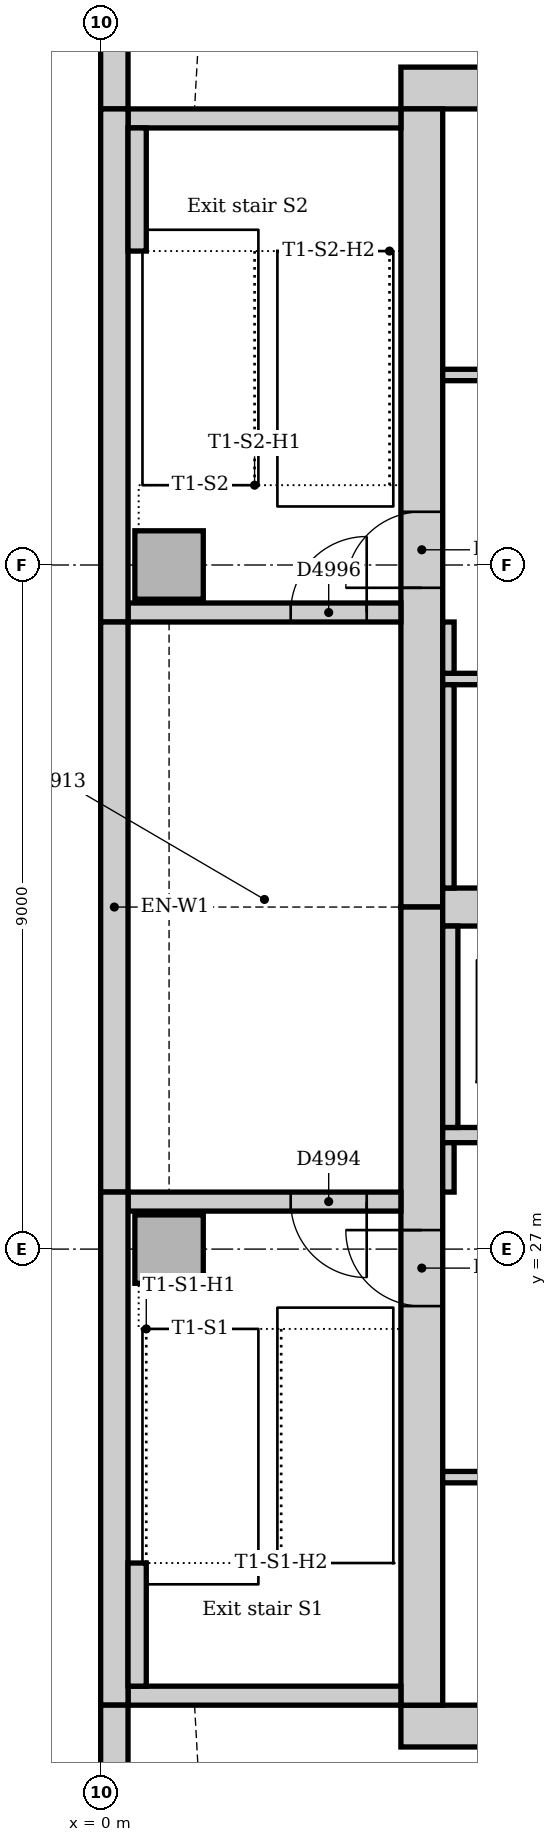
"""IFC4 building model, lengths in metres.
Left out: names, types, materials, properties, quantities, classifications, styles, units other than length and angle.
Written with IfcOpenShell. Run it as: python <this file> out.ifc"""

import sys

from ifc_helpers import new_model, si_unit, direction, frame, frame_2d, origin, origin_2d, place, context, subcontext, project, spatial, rectangle, extrude, element, fill, save


model = new_model("IFC4")
c1 = context("Model", 3, precision=1e-05, world=origin(), true_north=direction((0.0, 1.0)))
c2 = subcontext(c1, "Body", "Model", "MODEL_VIEW")
j1 = project(units=[si_unit("LENGTHUNIT", "METRE"), si_unit("PLANEANGLEUNIT", "RADIAN")], contexts=[c1])
p1 = place(None, origin())
s1 = spatial("IfcSite", under=j1, at=p1, CompositionType="ELEMENT")
p2 = place(p1, origin())
s2 = spatial("IfcBuilding", under=s1, at=p2, CompositionType="ELEMENT")
p3 = place(p2, frame((0.0, 0.0, 206.0)))
s3 = spatial("IfcBuildingStorey", under=s2, at=p3, CompositionType="ELEMENT", Elevation=206.0)
for number, where, z_axis, x_axis in (
    (1, (3.95, 20.725, 0.0), (0.0, 0.0, 1.0), (1.0, 0.0, 0.0)),
    (2, (23.05, 42.275, 0.0), (0.0, 0.0, 1.0), (-1.0, 0.0, 0.0)),
):
    element("IfcWall", number, at=place(p3, frame(where, z_axis=z_axis, x_axis=x_axis)), inside=s3, PredefinedType="SOLIDWALL", context=c2, shape_type="SweptSolid", body=[
        extrude(rectangle(XDim=19.1, YDim=0.55, at=frame_2d((9.55, 0.0))), origin(), (0.0, 0.0, 1.0), 4.0),
    ])
p4 = place(p3, frame((4.225, 42.0, 0.0), z_axis=(0.0, 0.0, 1.0), x_axis=(0.0, -1.0, 0.0)))
e3 = element("IfcWall", 3, at=p4, inside=s3, PredefinedType="SOLIDWALL", context=c2, shape_type="SweptSolid", body=[
    extrude(rectangle(XDim=10.5, YDim=0.55, at=frame_2d((5.25, 0.0))), origin(), (0.0, 0.0, 1.0), 4.0),
])
p5 = place(p4, frame((5.3, 0.0, 0.0)))
e4 = element("IfcOpeningElement", 4, at=p5, cuts=e3, PredefinedType="OPENING", context=c2, shape_type="SweptSolid", body=[
    extrude(rectangle(XDim=1.0, YDim=2.1, at=frame_2d((0.5, 1.05))), frame((0.0, 0.285, 0.0), z_axis=(0.0, -1.0, 0.0), x_axis=(1.0, 0.0, 0.0)), (0.0, 0.0, 1.0), 0.57),
])
p6 = place(p3, frame((4.225, 31.5, 0.0), z_axis=(0.0, 0.0, 1.0), x_axis=(0.0, -1.0, 0.0)))
e5 = element("IfcWall", 5, at=p6, inside=s3, PredefinedType="SOLIDWALL", context=c2, shape_type="SweptSolid", body=[
    extrude(rectangle(XDim=10.5, YDim=0.55, at=frame_2d((5.25, 0.0))), origin(), (0.0, 0.0, 1.0), 4.0),
])
p7 = place(p6, frame((4.25, 0.0, 0.0)))
e6 = element("IfcOpeningElement", 6, at=p7, cuts=e5, PredefinedType="OPENING", context=c2, shape_type="SweptSolid", body=[
    extrude(rectangle(XDim=1.0, YDim=2.1, at=frame_2d((0.5, 1.05))), frame((0.0, 0.285, 0.0), z_axis=(0.0, -1.0, 0.0), x_axis=(1.0, 0.0, 0.0)), (0.0, 0.0, 1.0), 0.57),
])
p8 = place(p3, frame((4.5, 31.5, 0.0), z_axis=(0.0, 0.0, 1.0), x_axis=(1.0, 0.0, 0.0)))
e7 = element("IfcWall", 7, at=p8, inside=s3, PredefinedType="SOLIDWALL", context=c2, shape_type="SweptSolid", body=[
    extrude(rectangle(XDim=18.0, YDim=0.5, at=frame_2d((9.0, 0.0))), origin(), (0.0, 0.0, 1.0), 4.0),
])
p9 = place(p3, frame((0.36, 21.125, 0.0), z_axis=(0.0, 0.0, 1.0), x_axis=(1.0, 0.0, 0.0)))
e8 = element("IfcWall", 8, at=p9, inside=s3, PredefinedType="SOLIDWALL", context=c2, shape_type="SweptSolid", body=[
    extrude(rectangle(XDim=3.59, YDim=0.25, at=frame_2d((1.795, 0.0))), origin(), (0.0, 0.0, 1.0), 4.0),
])
p10 = place(p3, frame((3.95, 27.625, 0.0), z_axis=(0.0, 0.0, 1.0), x_axis=(-1.0, 0.0, 0.0)))
e9 = element("IfcWall", 9, at=p10, inside=s3, PredefinedType="SOLIDWALL", context=c2, shape_type="SweptSolid", body=[
    extrude(rectangle(XDim=3.59, YDim=0.25, at=frame_2d((1.795, 0.0))), origin(), (0.0, 0.0, 1.0), 4.0),
])
p11 = place(p10, frame((0.45, 0.0, 0.0)))
e10 = element("IfcOpeningElement", 10, at=p11, cuts=e9, PredefinedType="OPENING", context=c2, shape_type="SweptSolid", body=[
    extrude(rectangle(XDim=1.0, YDim=2.1, at=frame_2d((0.5, 1.05))), frame((0.0, 0.135, 0.0), z_axis=(0.0, -1.0, 0.0), x_axis=(1.0, 0.0, 0.0)), (0.0, 0.0, 1.0), 0.27),
])
p12 = place(p3, frame((0.36, 35.375, 0.0), z_axis=(0.0, 0.0, 1.0), x_axis=(1.0, 0.0, 0.0)))
e11 = element("IfcWall", 11, at=p12, inside=s3, PredefinedType="SOLIDWALL", context=c2, shape_type="SweptSolid", body=[
    extrude(rectangle(XDim=3.59, YDim=0.25, at=frame_2d((1.795, 0.0))), origin(), (0.0, 0.0, 1.0), 4.0),
])
p13 = place(p12, frame((2.14, 0.0, 0.0)))
e12 = element("IfcOpeningElement", 12, at=p13, cuts=e11, PredefinedType="OPENING", context=c2, shape_type="SweptSolid", body=[
    extrude(rectangle(XDim=1.0, YDim=2.1, at=frame_2d((0.5, 1.05))), frame((0.0, 0.135, 0.0), z_axis=(0.0, -1.0, 0.0), x_axis=(1.0, 0.0, 0.0)), (0.0, 0.0, 1.0), 0.27),
])
p14 = place(p3, frame((3.95, 41.875, 0.0), z_axis=(0.0, 0.0, 1.0), x_axis=(-1.0, 0.0, 0.0)))
e13 = element("IfcWall", 13, at=p14, inside=s3, PredefinedType="SOLIDWALL", context=c2, shape_type="SweptSolid", body=[
    extrude(rectangle(XDim=3.59, YDim=0.25, at=frame_2d((1.795, 0.0))), origin(), (0.0, 0.0, 1.0), 4.0),
])
for number, where, z_axis, x_axis in (
    (14, (0.9, 27.0, 0.0), (0.0, 0.0, 1.0), (1.0, 0.0, 0.0)),
    (15, (0.9, 36.0, 0.0), (0.0, 0.0, 1.0), (1.0, 0.0, 0.0)),
):
    element("IfcColumn", number, at=place(p3, frame(where, z_axis=z_axis, x_axis=x_axis)), inside=s3, PredefinedType="COLUMN", context=c2, shape_type="SweptSolid", body=[
        extrude(rectangle(XDim=0.9, YDim=0.9, at=origin_2d()), origin(), (0.0, 0.0, 1.0), 4.0),
    ])
p15 = place(p3, frame((0.18, 54.257, 0.0), z_axis=(0.0, 0.0, 1.0), x_axis=(0.0, -1.0, 0.0)))
e16 = element("IfcWall", 16, at=p15, inside=s3, PredefinedType="STANDARD", context=c2, shape_type="SweptSolid", body=[
    extrude(rectangle(XDim=12.257, YDim=0.36, at=frame_2d((6.129, 0.0))), origin(), (0.0, 0.0, 1.0), 3.85),
])
p16 = place(p15, frame((3.107, 0.0, 0.9)))
e17 = element("IfcOpeningElement", 17, at=p16, cuts=e16, PredefinedType="OPENING", context=c2, shape_type="SweptSolid", body=[
    extrude(rectangle(XDim=3.3, YDim=1.6, at=frame_2d((1.65, 0.8))), frame((0.0, 0.19, 0.0), z_axis=(0.0, -1.0, 0.0), x_axis=(1.0, 0.0, 0.0)), (0.0, 0.0, 1.0), 0.38),
])
p17 = place(p15, frame((7.607, 0.0, 0.9)))
e18 = element("IfcOpeningElement", 18, at=p17, cuts=e16, PredefinedType="OPENING", context=c2, shape_type="SweptSolid", body=[
    extrude(rectangle(XDim=3.3, YDim=1.6, at=frame_2d((1.65, 0.8))), frame((0.0, 0.19, 0.0), z_axis=(0.0, -1.0, 0.0), x_axis=(1.0, 0.0, 0.0)), (0.0, 0.0, 1.0), 0.38),
])
p18 = place(p3, frame((0.18, 42.0, 0.0), z_axis=(0.0, 0.0, 1.0), x_axis=(0.0, -1.0, 0.0)))
e19 = element("IfcWall", 19, at=p18, inside=s3, PredefinedType="STANDARD", context=c2, shape_type="SweptSolid", body=[
    extrude(rectangle(XDim=6.75, YDim=0.36, at=frame_2d((3.375, 0.0))), origin(), (0.0, 0.0, 1.0), 3.85),
])
p19 = place(p3, frame((0.18, 35.25, 0.0), z_axis=(0.0, 0.0, 1.0), x_axis=(0.0, -1.0, 0.0)))
e20 = element("IfcWall", 20, at=p19, inside=s3, PredefinedType="STANDARD", context=c2, shape_type="SweptSolid", body=[
    extrude(rectangle(XDim=7.5, YDim=0.36, at=frame_2d((3.75, 0.0))), origin(), (0.0, 0.0, 1.0), 3.85),
])
p20 = place(p3, frame((0.18, 27.75, 0.0), z_axis=(0.0, 0.0, 1.0), x_axis=(0.0, -1.0, 0.0)))
e21 = element("IfcWall", 21, at=p20, inside=s3, PredefinedType="STANDARD", context=c2, shape_type="SweptSolid", body=[
    extrude(rectangle(XDim=6.75, YDim=0.36, at=frame_2d((3.375, 0.0))), origin(), (0.0, 0.0, 1.0), 3.85),
])
p21 = place(p3, frame((0.18, 21.0, 0.0), z_axis=(0.0, 0.0, 1.0), x_axis=(0.0, -1.0, 0.0)))
e22 = element("IfcWall", 22, at=p21, inside=s3, PredefinedType="STANDARD", context=c2, shape_type="SweptSolid", body=[
    extrude(rectangle(XDim=3.257, YDim=0.36, at=frame_2d((1.629, 0.0))), origin(), (0.0, 0.0, 1.0), 3.85),
])
for number, where, z_axis, x_axis in (
    (23, (0.48, 21.25, 0.0), (0.0, 0.0, 1.0), (0.0, 1.0, 0.0)),
    (24, (0.48, 40.13, 0.0), (0.0, 0.0, 1.0), (0.0, 1.0, 0.0)),
):
    element("IfcWall", number, at=place(p3, frame(where, z_axis=z_axis, x_axis=x_axis)), inside=s3, PredefinedType="STANDARD", context=c2, shape_type="SweptSolid", body=[
        extrude(rectangle(XDim=1.62, YDim=0.24, at=frame_2d((0.81, 0.0))), origin(), (0.0, 0.0, 1.0), 4.0),
    ])
p22 = place(p3, frame((4.5, 28.5, 0.0), z_axis=(0.0, 0.0, 1.0), x_axis=(1.0, 0.0, 0.0)))
e25 = element("IfcWall", 25, at=p22, inside=s3, PredefinedType="PARTITIONING", context=c2, shape_type="SweptSolid", body=[
    extrude(rectangle(XDim=18.0, YDim=0.2, at=frame_2d((9.0, 0.0))), origin(), (0.0, 0.0, 1.0), 3.85),
])
p23 = place(p22, frame((0.95, 0.0, 0.0)))
e26 = element("IfcOpeningElement", 26, at=p23, cuts=e25, PredefinedType="OPENING", context=c2, shape_type="SweptSolid", body=[
    extrude(rectangle(XDim=1.1, YDim=2.1, at=frame_2d((0.55, 1.05))), frame((0.0, 0.11, 0.0), z_axis=(0.0, -1.0, 0.0), x_axis=(1.0, 0.0, 0.0)), (0.0, 0.0, 1.0), 0.22),
])
p24 = place(p22, frame((3.95, 0.0, 0.0)))
e27 = element("IfcOpeningElement", 27, at=p24, cuts=e25, PredefinedType="OPENING", context=c2, shape_type="SweptSolid", body=[
    extrude(rectangle(XDim=1.1, YDim=2.1, at=frame_2d((0.55, 1.05))), frame((0.0, 0.11, 0.0), z_axis=(0.0, -1.0, 0.0), x_axis=(1.0, 0.0, 0.0)), (0.0, 0.0, 1.0), 0.22),
])
p25 = place(p22, frame((6.95, 0.0, 0.0)))
e28 = element("IfcOpeningElement", 28, at=p25, cuts=e25, PredefinedType="OPENING", context=c2, shape_type="SweptSolid", body=[
    extrude(rectangle(XDim=1.1, YDim=2.1, at=frame_2d((0.55, 1.05))), frame((0.0, 0.11, 0.0), z_axis=(0.0, -1.0, 0.0), x_axis=(1.0, 0.0, 0.0)), (0.0, 0.0, 1.0), 0.22),
])
p26 = place(p22, frame((9.95, 0.0, 0.0)))
e29 = element("IfcOpeningElement", 29, at=p26, cuts=e25, PredefinedType="OPENING", context=c2, shape_type="SweptSolid", body=[
    extrude(rectangle(XDim=1.1, YDim=2.1, at=frame_2d((0.55, 1.05))), frame((0.0, 0.11, 0.0), z_axis=(0.0, -1.0, 0.0), x_axis=(1.0, 0.0, 0.0)), (0.0, 0.0, 1.0), 0.22),
])
p27 = place(p22, frame((12.95, 0.0, 0.0)))
e30 = element("IfcOpeningElement", 30, at=p27, cuts=e25, PredefinedType="OPENING", context=c2, shape_type="SweptSolid", body=[
    extrude(rectangle(XDim=1.1, YDim=2.1, at=frame_2d((0.55, 1.05))), frame((0.0, 0.11, 0.0), z_axis=(0.0, -1.0, 0.0), x_axis=(1.0, 0.0, 0.0)), (0.0, 0.0, 1.0), 0.22),
])
p28 = place(p22, frame((15.95, 0.0, 0.0)))
e31 = element("IfcOpeningElement", 31, at=p28, cuts=e25, PredefinedType="OPENING", context=c2, shape_type="SweptSolid", body=[
    extrude(rectangle(XDim=1.1, YDim=2.1, at=frame_2d((0.55, 1.05))), frame((0.0, 0.11, 0.0), z_axis=(0.0, -1.0, 0.0), x_axis=(1.0, 0.0, 0.0)), (0.0, 0.0, 1.0), 0.22),
])
p29 = place(p3, frame((4.6, 28.6, 0.0), z_axis=(0.0, 0.0, 1.0), x_axis=(0.0, 1.0, 0.0)))
e32 = element("IfcWall", 32, at=p29, inside=s3, PredefinedType="PARTITIONING", context=c2, shape_type="SweptSolid", body=[
    extrude(rectangle(XDim=2.65, YDim=0.2, at=frame_2d((1.325, 0.0))), origin(), (0.0, 0.0, 1.0), 3.85),
])
p30 = place(p3, frame((4.5, 24.0, 0.0), z_axis=(0.0, 0.0, 1.0), x_axis=(1.0, 0.0, 0.0)))
e33 = element("IfcWall", 33, at=p30, inside=s3, PredefinedType="PARTITIONING", context=c2, shape_type="SweptSolid", body=[
    extrude(rectangle(XDim=18.0, YDim=0.15, at=frame_2d((9.0, 0.0))), origin(), (0.0, 0.0, 1.0), 3.85),
])
p31 = place(p30, frame((4.1, 0.0, 0.0)))
e34 = element("IfcOpeningElement", 34, at=p31, cuts=e33, PredefinedType="OPENING", context=c2, shape_type="SweptSolid", body=[
    extrude(rectangle(XDim=0.9, YDim=2.1, at=frame_2d((0.45, 1.05))), frame((0.0, 0.085, 0.0), z_axis=(0.0, -1.0, 0.0), x_axis=(1.0, 0.0, 0.0)), (0.0, 0.0, 1.0), 0.17),
])
p32 = place(p30, frame((10.8, 0.0, 0.0)))
e35 = element("IfcOpeningElement", 35, at=p32, cuts=e33, PredefinedType="OPENING", context=c2, shape_type="SweptSolid", body=[
    extrude(rectangle(XDim=0.9, YDim=2.1, at=frame_2d((0.45, 1.05))), frame((0.0, 0.085, 0.0), z_axis=(0.0, -1.0, 0.0), x_axis=(1.0, 0.0, 0.0)), (0.0, 0.0, 1.0), 0.17),
])
p33 = place(p30, frame((15.2, 0.0, 0.0)))
e36 = element("IfcOpeningElement", 36, at=p33, cuts=e33, PredefinedType="OPENING", context=c2, shape_type="SweptSolid", body=[
    extrude(rectangle(XDim=0.9, YDim=2.1, at=frame_2d((0.45, 1.05))), frame((0.0, 0.085, 0.0), z_axis=(0.0, -1.0, 0.0), x_axis=(1.0, 0.0, 0.0)), (0.0, 0.0, 1.0), 0.17),
])
p34 = place(p3, frame((4.5, 38.5, 0.0), z_axis=(0.0, 0.0, 1.0), x_axis=(1.0, 0.0, 0.0)))
e37 = element("IfcWall", 37, at=p34, inside=s3, PredefinedType="PARTITIONING", context=c2, shape_type="SweptSolid", body=[
    extrude(rectangle(XDim=11.9, YDim=0.15, at=frame_2d((5.95, 0.0))), origin(), (0.0, 0.0, 1.0), 3.85),
])
p35 = place(p34, frame((1.85, 0.0, 0.0)))
e38 = element("IfcOpeningElement", 38, at=p35, cuts=e37, PredefinedType="OPENING", context=c2, shape_type="SweptSolid", body=[
    extrude(rectangle(XDim=0.9, YDim=2.1, at=frame_2d((0.45, 1.05))), frame((0.0, 0.085, 0.0), z_axis=(0.0, -1.0, 0.0), x_axis=(1.0, 0.0, 0.0)), (0.0, 0.0, 1.0), 0.17),
])
p36 = place(p34, frame((5.55, 0.0, 0.0)))
e39 = element("IfcOpeningElement", 39, at=p36, cuts=e37, PredefinedType="OPENING", context=c2, shape_type="SweptSolid", body=[
    extrude(rectangle(XDim=0.9, YDim=2.1, at=frame_2d((0.45, 1.05))), frame((0.0, 0.085, 0.0), z_axis=(0.0, -1.0, 0.0), x_axis=(1.0, 0.0, 0.0)), (0.0, 0.0, 1.0), 0.17),
])
p37 = place(p34, frame((7.8, 0.0, 0.0)))
e40 = element("IfcOpeningElement", 40, at=p37, cuts=e37, PredefinedType="OPENING", context=c2, shape_type="SweptSolid", body=[
    extrude(rectangle(XDim=0.9, YDim=2.1, at=frame_2d((0.45, 1.05))), frame((0.0, 0.085, 0.0), z_axis=(0.0, -1.0, 0.0), x_axis=(1.0, 0.0, 0.0)), (0.0, 0.0, 1.0), 0.17),
])
p38 = place(p34, frame((9.95, 0.0, 0.0)))
e41 = element("IfcOpeningElement", 41, at=p38, cuts=e37, PredefinedType="OPENING", context=c2, shape_type="SweptSolid", body=[
    extrude(rectangle(XDim=0.8, YDim=2.1, at=frame_2d((0.4, 1.05))), frame((0.0, 0.085, 0.0), z_axis=(0.0, -1.0, 0.0), x_axis=(1.0, 0.0, 0.0)), (0.0, 0.0, 1.0), 0.17),
])
p39 = place(p3, frame((4.5, 34.5, 0.0), z_axis=(0.0, 0.0, 1.0), x_axis=(1.0, 0.0, 0.0)))
e42 = element("IfcWall", 42, at=p39, inside=s3, PredefinedType="PARTITIONING", context=c2, shape_type="SweptSolid", body=[
    extrude(rectangle(XDim=5.9, YDim=0.15, at=frame_2d((2.95, 0.0))), origin(), (0.0, 0.0, 1.0), 3.85),
])
p40 = place(p39, frame((1.1, 0.0, 0.0)))
e43 = element("IfcOpeningElement", 43, at=p40, cuts=e42, PredefinedType="OPENING", context=c2, shape_type="SweptSolid", body=[
    extrude(rectangle(XDim=0.9, YDim=2.1, at=frame_2d((0.45, 1.05))), frame((0.0, 0.085, 0.0), z_axis=(0.0, -1.0, 0.0), x_axis=(1.0, 0.0, 0.0)), (0.0, 0.0, 1.0), 0.17),
])
p41 = place(p39, frame((3.9, 0.0, 0.0)))
e44 = element("IfcOpeningElement", 44, at=p41, cuts=e42, PredefinedType="OPENING", context=c2, shape_type="SweptSolid", body=[
    extrude(rectangle(XDim=0.9, YDim=2.1, at=frame_2d((0.45, 1.05))), frame((0.0, 0.085, 0.0), z_axis=(0.0, -1.0, 0.0), x_axis=(1.0, 0.0, 0.0)), (0.0, 0.0, 1.0), 0.17),
])
p42 = place(p3, frame((4.575, 34.575, 0.0), z_axis=(0.0, 0.0, 1.0), x_axis=(0.0, 1.0, 0.0)))
e45 = element("IfcWall", 45, at=p42, inside=s3, PredefinedType="PARTITIONING", context=c2, shape_type="SweptSolid", body=[
    extrude(rectangle(XDim=0.675, YDim=0.15, at=frame_2d((0.338, 0.0))), origin(), (0.0, 0.0, 1.0), 3.85),
])
p43 = place(p3, frame((4.575, 31.75, 0.0), z_axis=(0.0, 0.0, 1.0), x_axis=(0.0, 1.0, 0.0)))
e46 = element("IfcWall", 46, at=p43, inside=s3, PredefinedType="PARTITIONING", context=c2, shape_type="SweptSolid", body=[
    extrude(rectangle(XDim=2.675, YDim=0.15, at=frame_2d((1.337, 0.0))), origin(), (0.0, 0.0, 1.0), 3.85),
])
p44 = place(p3, frame((4.575, 27.75, 0.0), z_axis=(0.0, 0.0, 1.0), x_axis=(0.0, 1.0, 0.0)))
e47 = element("IfcWall", 47, at=p44, inside=s3, PredefinedType="PARTITIONING", context=c2, shape_type="SweptSolid", body=[
    extrude(rectangle(XDim=0.65, YDim=0.15, at=frame_2d((0.325, 0.0))), origin(), (0.0, 0.0, 1.0), 3.85),
])
p45 = place(p7, frame((1.0, 0.0, 0.0), z_axis=(0.0, 0.0, 1.0), x_axis=(-1.0, 0.0, 0.0)))
e48 = element("IfcDoor", 48, at=p45, inside=s3, OperationType="SINGLE_SWING_RIGHT", PredefinedType="DOOR", context=c2, shape_type="SweptSolid", body=[
    extrude(rectangle(XDim=1.0, YDim=2.1, at=frame_2d((0.5, 1.05))), frame((0.0, 0.025, 0.0), z_axis=(0.0, -1.0, 0.0), x_axis=(1.0, 0.0, 0.0)), (0.0, 0.0, 1.0), 0.05),
])
fill(e6, e48)
p46 = place(p11, origin())
e49 = element("IfcDoor", 49, at=p46, inside=s3, OperationType="SINGLE_SWING_LEFT", PredefinedType="DOOR", context=c2, shape_type="SweptSolid", body=[
    extrude(rectangle(XDim=1.0, YDim=2.1, at=frame_2d((0.5, 1.05))), frame((0.0, 0.025, 0.0), z_axis=(0.0, -1.0, 0.0), x_axis=(1.0, 0.0, 0.0)), (0.0, 0.0, 1.0), 0.05),
])
fill(e10, e49)
p47 = place(p5, frame((1.0, 0.0, 0.0), z_axis=(0.0, 0.0, 1.0), x_axis=(-1.0, 0.0, 0.0)))
e50 = element("IfcDoor", 50, at=p47, inside=s3, OperationType="SINGLE_SWING_LEFT", PredefinedType="DOOR", context=c2, shape_type="SweptSolid", body=[
    extrude(rectangle(XDim=1.0, YDim=2.1, at=frame_2d((0.5, 1.05))), frame((0.0, 0.025, 0.0), z_axis=(0.0, -1.0, 0.0), x_axis=(1.0, 0.0, 0.0)), (0.0, 0.0, 1.0), 0.05),
])
fill(e4, e50)
p48 = place(p13, origin())
e51 = element("IfcDoor", 51, at=p48, inside=s3, OperationType="SINGLE_SWING_RIGHT", PredefinedType="DOOR", context=c2, shape_type="SweptSolid", body=[
    extrude(rectangle(XDim=1.0, YDim=2.1, at=frame_2d((0.5, 1.05))), frame((0.0, 0.025, 0.0), z_axis=(0.0, -1.0, 0.0), x_axis=(1.0, 0.0, 0.0)), (0.0, 0.0, 1.0), 0.05),
])
fill(e12, e51)
save(model, sys.argv[1])
